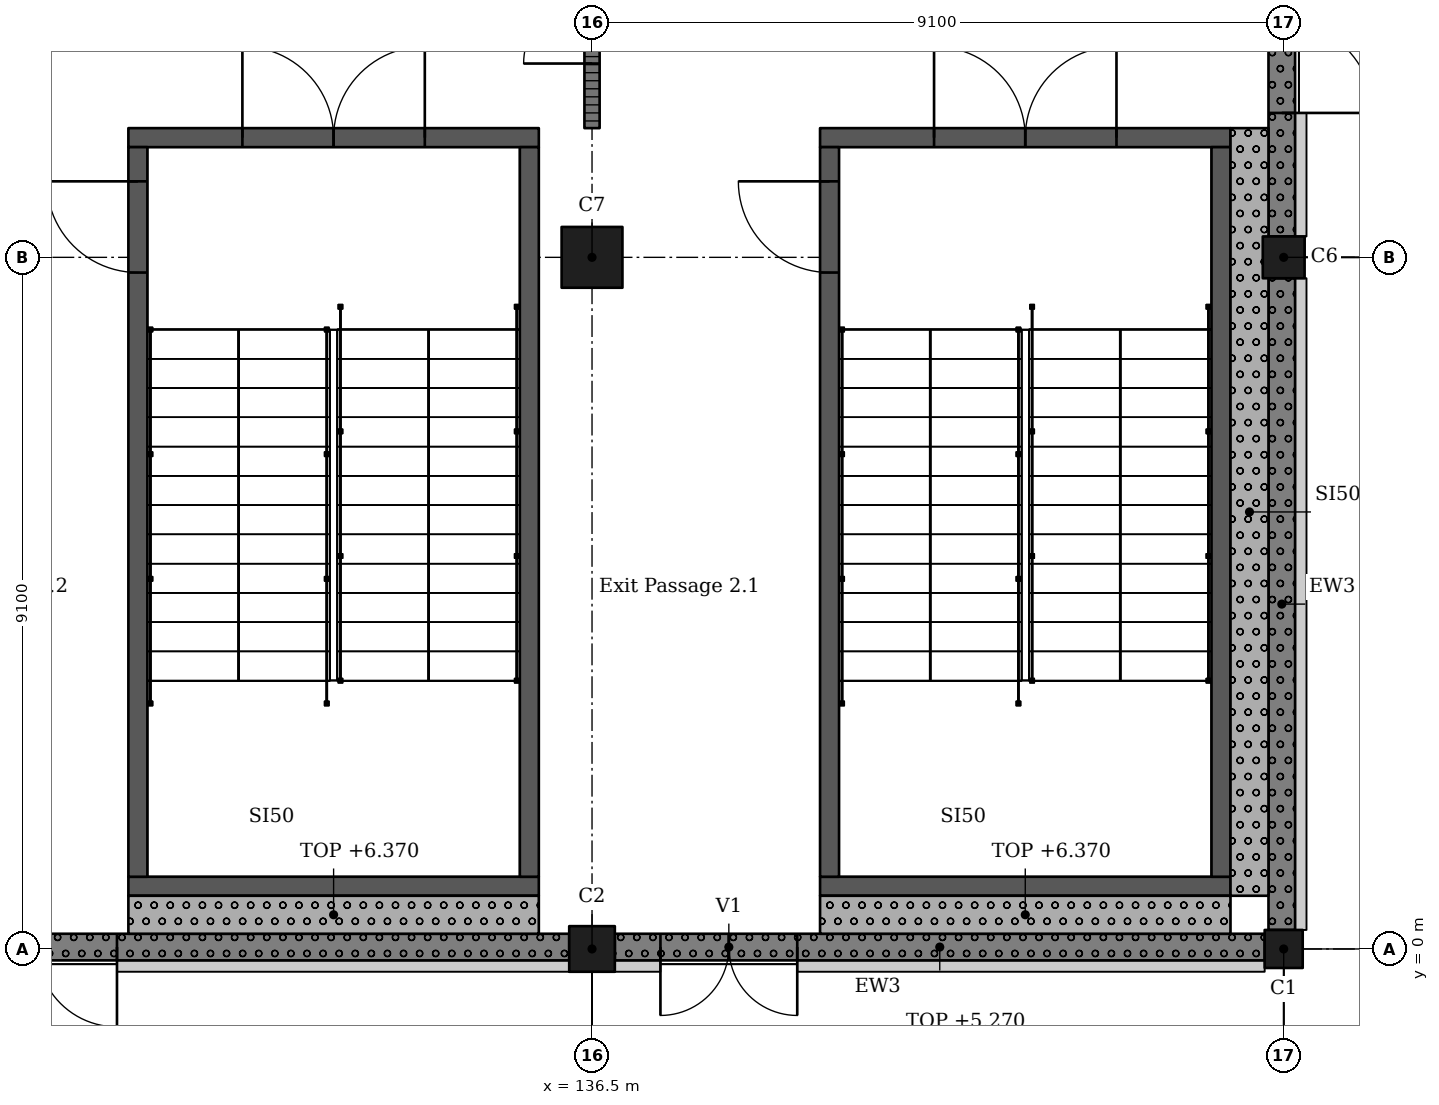
"""IFC4 building model, lengths in metres.
Left out: names, types, materials, properties, quantities, classifications, styles, units other than length and angle.
Written with IfcOpenShell. Run it as: python <this file> out.ifc"""

import sys

from ifc_helpers import new_model, si_unit, direction, frame, frame_2d, origin, origin_2d, place, context, subcontext, project, spatial, rectangle, extrude, element, fill, save


model = new_model("IFC4")
c1 = context("Model", 3, precision=1e-05, world=origin(), true_north=direction((0.0, 1.0)))
c2 = subcontext(c1, "Body", "Model", "MODEL_VIEW")
j1 = project(units=[si_unit("LENGTHUNIT", "METRE"), si_unit("PLANEANGLEUNIT", "RADIAN")], contexts=[c1])
p1 = place(None, origin())
s1 = spatial("IfcSite", under=j1, at=p1, CompositionType="ELEMENT")
p2 = place(p1, origin())
s2 = spatial("IfcBuilding", under=s1, at=p2, CompositionType="ELEMENT")
p3 = place(p2, origin())
s3 = spatial("IfcBuildingStorey", under=s2, at=p3, CompositionType="ELEMENT", Elevation=0.0)
p4 = place(p3, frame((136.5, 0.0, -0.4), z_axis=(0.0, 0.0, 1.0), x_axis=(1.0, 0.0, 0.0)))
e1 = element("IfcColumn", 1, at=p4, inside=s3, PredefinedType="COLUMN", context=c2, shape_type="SweptSolid", body=[
    extrude(rectangle(XDim=0.6, YDim=0.6, at=origin_2d()), origin(), (0.0, 0.0, 1.0), 6.77),
])
p5 = place(p3, frame((136.5, 9.1, -0.4), z_axis=(0.0, 0.0, 1.0), x_axis=(1.0, 0.0, 0.0)))
e2 = element("IfcColumn", 2, at=p5, inside=s3, PredefinedType="COLUMN", context=c2, shape_type="SweptSolid", body=[
    extrude(rectangle(XDim=0.8, YDim=0.8, at=origin_2d()), origin(), (0.0, 0.0, 1.0), 6.77),
])
p6 = place(p3, frame((145.6, 0.0, -0.4), z_axis=(0.0, 0.0, 1.0), x_axis=(1.0, 0.0, 0.0)))
e3 = element("IfcColumn", 3, at=p6, inside=s3, PredefinedType="COLUMN", context=c2, shape_type="SweptSolid", body=[
    extrude(rectangle(XDim=0.5, YDim=0.5, at=origin_2d()), origin(), (0.0, 0.0, 1.0), 6.77),
])
p7 = place(p3, frame((145.6, 9.1, -0.4), z_axis=(0.0, 0.0, 1.0), x_axis=(1.0, 0.0, 0.0)))
e4 = element("IfcColumn", 4, at=p7, inside=s3, PredefinedType="COLUMN", context=c2, shape_type="SweptSolid", body=[
    extrude(rectangle(XDim=0.55, YDim=0.55, at=origin_2d()), origin(), (0.0, 0.0, 1.0), 6.77),
])
p8 = place(p3, frame((144.9, 0.825, -0.4), z_axis=(0.0, 0.0, 1.0), x_axis=(-1.0, 0.0, 0.0)))
e5 = element("IfcWall", 5, at=p8, inside=s3, PredefinedType="SHEAR", context=c2, shape_type="SweptSolid", body=[
    extrude(rectangle(XDim=5.4, YDim=0.25, at=frame_2d((2.7, 0.0))), origin(), (0.0, 0.0, 1.0), 6.77),
])
p9 = place(p3, frame((144.9, 10.675, -0.4), z_axis=(0.0, 0.0, 1.0), x_axis=(-1.0, 0.0, 0.0)))
e6 = element("IfcWall", 6, at=p9, inside=s3, PredefinedType="SHEAR", context=c2, shape_type="SweptSolid", body=[
    extrude(rectangle(XDim=5.4, YDim=0.25, at=frame_2d((2.7, 0.0))), origin(), (0.0, 0.0, 1.0), 6.77),
])
p10 = place(p9, frame((1.5, 0.0, 0.4)))
e7 = element("IfcOpeningElement", 7, at=p10, cuts=e6, PredefinedType="OPENING", context=c2, shape_type="SweptSolid", body=[
    extrude(rectangle(XDim=2.4, YDim=2.1, at=frame_2d((1.2, 1.05))), frame((0.0, 0.135, 0.0), z_axis=(0.0, -1.0, 0.0), x_axis=(1.0, 0.0, 0.0)), (0.0, 0.0, 1.0), 0.27),
])
p11 = place(p3, frame((139.625, 10.55, -0.4), z_axis=(0.0, 0.0, 1.0), x_axis=(0.0, -1.0, 0.0)))
e8 = element("IfcWall", 8, at=p11, inside=s3, PredefinedType="SHEAR", context=c2, shape_type="SweptSolid", body=[
    extrude(rectangle(XDim=9.6, YDim=0.25, at=frame_2d((4.8, 0.0))), origin(), (0.0, 0.0, 1.0), 6.77),
])
p12 = place(p11, frame((0.45, 0.0, 0.4)))
e9 = element("IfcOpeningElement", 9, at=p12, cuts=e8, PredefinedType="OPENING", context=c2, shape_type="SweptSolid", body=[
    extrude(rectangle(XDim=1.2, YDim=2.1, at=frame_2d((0.6, 1.05))), frame((0.0, 0.135, 0.0), z_axis=(0.0, -1.0, 0.0), x_axis=(1.0, 0.0, 0.0)), (0.0, 0.0, 1.0), 0.27),
])
p13 = place(p3, frame((144.775, 10.55, -0.4), z_axis=(0.0, 0.0, 1.0), x_axis=(0.0, -1.0, 0.0)))
e10 = element("IfcWall", 10, at=p13, inside=s3, PredefinedType="SHEAR", context=c2, shape_type="SweptSolid", body=[
    extrude(rectangle(XDim=9.6, YDim=0.25, at=frame_2d((4.8, 0.0))), origin(), (0.0, 0.0, 1.0), 6.77),
])
p14 = place(p3, frame((135.8, 0.825, -0.4), z_axis=(0.0, 0.0, 1.0), x_axis=(-1.0, 0.0, 0.0)))
e11 = element("IfcWall", 11, at=p14, inside=s3, PredefinedType="SHEAR", context=c2, shape_type="SweptSolid", body=[
    extrude(rectangle(XDim=5.4, YDim=0.25, at=frame_2d((2.7, 0.0))), origin(), (0.0, 0.0, 1.0), 6.77),
])
p15 = place(p3, frame((135.8, 10.675, -0.4), z_axis=(0.0, 0.0, 1.0), x_axis=(-1.0, 0.0, 0.0)))
e12 = element("IfcWall", 12, at=p15, inside=s3, PredefinedType="SHEAR", context=c2, shape_type="SweptSolid", body=[
    extrude(rectangle(XDim=5.4, YDim=0.25, at=frame_2d((2.7, 0.0))), origin(), (0.0, 0.0, 1.0), 6.77),
])
p16 = place(p15, frame((1.5, 0.0, 0.4)))
e13 = element("IfcOpeningElement", 13, at=p16, cuts=e12, PredefinedType="OPENING", context=c2, shape_type="SweptSolid", body=[
    extrude(rectangle(XDim=2.4, YDim=2.1, at=frame_2d((1.2, 1.05))), frame((0.0, 0.135, 0.0), z_axis=(0.0, -1.0, 0.0), x_axis=(1.0, 0.0, 0.0)), (0.0, 0.0, 1.0), 0.27),
])
p17 = place(p3, frame((130.525, 10.55, -0.4), z_axis=(0.0, 0.0, 1.0), x_axis=(0.0, -1.0, 0.0)))
e14 = element("IfcWall", 14, at=p17, inside=s3, PredefinedType="SHEAR", context=c2, shape_type="SweptSolid", body=[
    extrude(rectangle(XDim=9.6, YDim=0.25, at=frame_2d((4.8, 0.0))), origin(), (0.0, 0.0, 1.0), 6.77),
])
p18 = place(p17, frame((0.45, 0.0, 0.4)))
e15 = element("IfcOpeningElement", 15, at=p18, cuts=e14, PredefinedType="OPENING", context=c2, shape_type="SweptSolid", body=[
    extrude(rectangle(XDim=1.2, YDim=2.1, at=frame_2d((0.6, 1.05))), frame((0.0, 0.135, 0.0), z_axis=(0.0, -1.0, 0.0), x_axis=(1.0, 0.0, 0.0)), (0.0, 0.0, 1.0), 0.27),
])
p19 = place(p3, frame((135.675, 10.55, -0.4), z_axis=(0.0, 0.0, 1.0), x_axis=(0.0, -1.0, 0.0)))
e16 = element("IfcWall", 16, at=p19, inside=s3, PredefinedType="SHEAR", context=c2, shape_type="SweptSolid", body=[
    extrude(rectangle(XDim=9.6, YDim=0.25, at=frame_2d((4.8, 0.0))), origin(), (0.0, 0.0, 1.0), 6.77),
])
p20 = place(p3, frame((127.7, 0.025, 0.0), z_axis=(0.0, 0.0, 1.0), x_axis=(1.0, 0.0, 0.0)))
e17 = element("IfcWall", 17, at=p20, inside=s3, PredefinedType="SOLIDWALL", context=c2, shape_type="SweptSolid", body=[
    extrude(rectangle(XDim=8.5, YDim=0.35, at=frame_2d((4.25, 0.0))), origin(), (0.0, 0.0, 1.0), 5.27),
])
p21 = place(p20, frame((0.45, 0.0, 0.0)))
e18 = element("IfcOpeningElement", 18, at=p21, cuts=e17, PredefinedType="OPENING", context=c2, shape_type="SweptSolid", body=[
    extrude(rectangle(XDim=2.1, YDim=2.4, at=frame_2d((1.05, 1.2))), frame((0.0, 0.185, 0.0), z_axis=(0.0, -1.0, 0.0), x_axis=(1.0, 0.0, 0.0)), (0.0, 0.0, 1.0), 0.37),
])
p22 = place(p3, frame((136.8, 0.025, 0.0), z_axis=(0.0, 0.0, 1.0), x_axis=(1.0, 0.0, 0.0)))
e19 = element("IfcWall", 19, at=p22, inside=s3, PredefinedType="SOLIDWALL", context=c2, shape_type="SweptSolid", body=[
    extrude(rectangle(XDim=8.55, YDim=0.35, at=frame_2d((4.275, 0.0))), origin(), (0.0, 0.0, 1.0), 5.27),
])
p23 = place(p22, frame((0.6, 0.0, 0.0)))
e20 = element("IfcOpeningElement", 20, at=p23, cuts=e19, PredefinedType="OPENING", context=c2, shape_type="SweptSolid", body=[
    extrude(rectangle(XDim=1.8, YDim=2.4, at=frame_2d((0.9, 1.2))), frame((0.0, 0.185, 0.0), z_axis=(0.0, -1.0, 0.0), x_axis=(1.0, 0.0, 0.0)), (0.0, 0.0, 1.0), 0.37),
])
p24 = place(p3, frame((145.575, 0.25, 0.0), z_axis=(0.0, 0.0, 1.0), x_axis=(0.0, 1.0, 0.0)))
e21 = element("IfcWall", 21, at=p24, inside=s3, PredefinedType="SOLIDWALL", context=c2, shape_type="SweptSolid", body=[
    extrude(rectangle(XDim=8.575, YDim=0.35, at=frame_2d((4.288, 0.0))), origin(), (0.0, 0.0, 1.0), 5.27),
])
p25 = place(p3, frame((145.575, 9.375, 0.0), z_axis=(0.0, 0.0, 1.0), x_axis=(0.0, 1.0, 0.0)))
e22 = element("IfcWall", 22, at=p25, inside=s3, PredefinedType="SOLIDWALL", context=c2, shape_type="SweptSolid", body=[
    extrude(rectangle(XDim=8.525, YDim=0.35, at=frame_2d((4.262, 0.0))), origin(), (0.0, 0.0, 1.0), 5.27),
])
p26 = place(p25, frame((1.625, 0.0, 0.0)))
e23 = element("IfcOpeningElement", 23, at=p26, cuts=e22, PredefinedType="OPENING", context=c2, shape_type="SweptSolid", body=[
    extrude(rectangle(XDim=2.4, YDim=2.4, at=frame_2d((1.2, 1.2))), frame((0.0, 0.185, 0.0), z_axis=(0.0, -1.0, 0.0), x_axis=(1.0, 0.0, 0.0)), (0.0, 0.0, 1.0), 0.37),
])
p27 = place(p25, frame((4.625, 0.0, 0.0)))
e24 = element("IfcOpeningElement", 24, at=p27, cuts=e22, PredefinedType="OPENING", context=c2, shape_type="SweptSolid", body=[
    extrude(rectangle(XDim=2.4, YDim=2.4, at=frame_2d((1.2, 1.2))), frame((0.0, 0.185, 0.0), z_axis=(0.0, -1.0, 0.0), x_axis=(1.0, 0.0, 0.0)), (0.0, 0.0, 1.0), 0.37),
])
p28 = place(p3, frame((139.5, 0.45, 0.0), z_axis=(0.0, 0.0, 1.0), x_axis=(1.0, 0.0, 0.0)))
e25 = element("IfcWall", 25, at=p28, inside=s3, PredefinedType="SOLIDWALL", context=c2, shape_type="SweptSolid", body=[
    extrude(rectangle(XDim=5.4, YDim=0.5, at=frame_2d((2.7, 0.0))), origin(), (0.0, 0.0, 1.0), 6.37),
])
p29 = place(p3, frame((145.15, 0.7, 0.0), z_axis=(0.0, 0.0, 1.0), x_axis=(0.0, 1.0, 0.0)))
e26 = element("IfcWall", 26, at=p29, inside=s3, PredefinedType="SOLIDWALL", context=c2, shape_type="SweptSolid", body=[
    extrude(rectangle(XDim=10.1, YDim=0.5, at=frame_2d((5.05, 0.0))), origin(), (0.0, 0.0, 1.0), 6.37),
])
p30 = place(p3, frame((130.4, 0.45, 0.0), z_axis=(0.0, 0.0, 1.0), x_axis=(1.0, 0.0, 0.0)))
e27 = element("IfcWall", 27, at=p30, inside=s3, PredefinedType="SOLIDWALL", context=c2, shape_type="SweptSolid", body=[
    extrude(rectangle(XDim=5.4, YDim=0.5, at=frame_2d((2.7, 0.0))), origin(), (0.0, 0.0, 1.0), 6.37),
])
p31 = place(p3, frame((136.5, 10.8, 0.0), z_axis=(0.0, 0.0, 1.0), x_axis=(0.0, 1.0, 0.0)))
e28 = element("IfcWall", 28, at=p31, inside=s3, PredefinedType="PARTITIONING", context=c2, shape_type="SweptSolid", body=[
    extrude(rectangle(XDim=6.975, YDim=0.2, at=frame_2d((3.487, 0.0))), origin(), (0.0, 0.0, 1.0), 5.32),
])
p32 = place(p31, frame((0.85, 0.0, 0.0)))
e29 = element("IfcOpeningElement", 29, at=p32, cuts=e28, PredefinedType="OPENING", context=c2, shape_type="SweptSolid", body=[
    extrude(rectangle(XDim=1.8, YDim=2.4, at=frame_2d((0.9, 1.2))), frame((0.0, 0.11, 0.0), z_axis=(0.0, -1.0, 0.0), x_axis=(1.0, 0.0, 0.0)), (0.0, 0.0, 1.0), 0.22),
])
p33 = place(p31, frame((4.35, 0.0, 0.0)))
e30 = element("IfcOpeningElement", 30, at=p33, cuts=e28, PredefinedType="OPENING", context=c2, shape_type="SweptSolid", body=[
    extrude(rectangle(XDim=1.8, YDim=2.4, at=frame_2d((0.9, 1.2))), frame((0.0, 0.11, 0.0), z_axis=(0.0, -1.0, 0.0), x_axis=(1.0, 0.0, 0.0)), (0.0, 0.0, 1.0), 0.22),
])
p34 = place(p21, frame((2.1, 0.0, 0.0), z_axis=(0.0, 0.0, 1.0), x_axis=(-1.0, 0.0, 0.0)))
e31 = element("IfcDoor", 31, at=p34, inside=s3, OperationType="DOUBLE_DOOR_SINGLE_SWING", PredefinedType="DOOR", context=c2, shape_type="SweptSolid", body=[
    extrude(rectangle(XDim=2.1, YDim=2.4, at=frame_2d((1.05, 1.2))), frame((0.0, 0.025, 0.0), z_axis=(0.0, -1.0, 0.0), x_axis=(1.0, 0.0, 0.0)), (0.0, 0.0, 1.0), 0.05),
])
fill(e18, e31)
p35 = place(p23, frame((1.8, 0.0, 0.0), z_axis=(0.0, 0.0, 1.0), x_axis=(-1.0, 0.0, 0.0)))
e32 = element("IfcDoor", 32, at=p35, inside=s3, OperationType="DOUBLE_DOOR_SINGLE_SWING", PredefinedType="DOOR", context=c2, shape_type="SweptSolid", body=[
    extrude(rectangle(XDim=1.8, YDim=2.4, at=frame_2d((0.9, 1.2))), frame((0.0, 0.025, 0.0), z_axis=(0.0, -1.0, 0.0), x_axis=(1.0, 0.0, 0.0)), (0.0, 0.0, 1.0), 0.05),
])
fill(e20, e32)
p36 = place(p26, frame((2.4, 0.0, 0.0), z_axis=(0.0, 0.0, 1.0), x_axis=(-1.0, 0.0, 0.0)))
e33 = element("IfcDoor", 33, at=p36, inside=s3, OperationType="DOUBLE_DOOR_SINGLE_SWING", PredefinedType="DOOR", context=c2, shape_type="SweptSolid", body=[
    extrude(rectangle(XDim=2.4, YDim=2.4, at=frame_2d((1.2, 1.2))), frame((0.0, 0.025, 0.0), z_axis=(0.0, -1.0, 0.0), x_axis=(1.0, 0.0, 0.0)), (0.0, 0.0, 1.0), 0.05),
])
fill(e23, e33)
p37 = place(p32, origin())
e34 = element("IfcDoor", 34, at=p37, inside=s3, OperationType="DOUBLE_DOOR_SINGLE_SWING", PredefinedType="DOOR", context=c2, shape_type="SweptSolid", body=[
    extrude(rectangle(XDim=1.8, YDim=2.4, at=frame_2d((0.9, 1.2))), frame((0.0, 0.025, 0.0), z_axis=(0.0, -1.0, 0.0), x_axis=(1.0, 0.0, 0.0)), (0.0, 0.0, 1.0), 0.05),
])
fill(e29, e34)
p38 = place(p10, origin())
e35 = element("IfcDoor", 35, at=p38, inside=s3, OperationType="DOUBLE_DOOR_SINGLE_SWING", PredefinedType="DOOR", context=c2, shape_type="SweptSolid", body=[
    extrude(rectangle(XDim=2.4, YDim=2.1, at=frame_2d((1.2, 1.05))), frame((0.0, 0.025, 0.0), z_axis=(0.0, -1.0, 0.0), x_axis=(1.0, 0.0, 0.0)), (0.0, 0.0, 1.0), 0.05),
])
fill(e7, e35)
p39 = place(p16, origin())
e36 = element("IfcDoor", 36, at=p39, inside=s3, OperationType="DOUBLE_DOOR_SINGLE_SWING", PredefinedType="DOOR", context=c2, shape_type="SweptSolid", body=[
    extrude(rectangle(XDim=2.4, YDim=2.1, at=frame_2d((1.2, 1.05))), frame((0.0, 0.025, 0.0), z_axis=(0.0, -1.0, 0.0), x_axis=(1.0, 0.0, 0.0)), (0.0, 0.0, 1.0), 0.05),
])
fill(e13, e36)
p40 = place(p12, origin())
e37 = element("IfcDoor", 37, at=p40, inside=s3, OperationType="SINGLE_SWING_LEFT", PredefinedType="DOOR", context=c2, shape_type="SweptSolid", body=[
    extrude(rectangle(XDim=1.2, YDim=2.1, at=frame_2d((0.6, 1.05))), frame((0.0, 0.025, 0.0), z_axis=(0.0, -1.0, 0.0), x_axis=(1.0, 0.0, 0.0)), (0.0, 0.0, 1.0), 0.05),
])
fill(e9, e37)
p41 = place(p18, origin())
e38 = element("IfcDoor", 38, at=p41, inside=s3, OperationType="SINGLE_SWING_LEFT", PredefinedType="DOOR", context=c2, shape_type="SweptSolid", body=[
    extrude(rectangle(XDim=1.2, YDim=2.1, at=frame_2d((0.6, 1.05))), frame((0.0, 0.025, 0.0), z_axis=(0.0, -1.0, 0.0), x_axis=(1.0, 0.0, 0.0)), (0.0, 0.0, 1.0), 0.05),
])
fill(e15, e38)
save(model, sys.argv[1])
